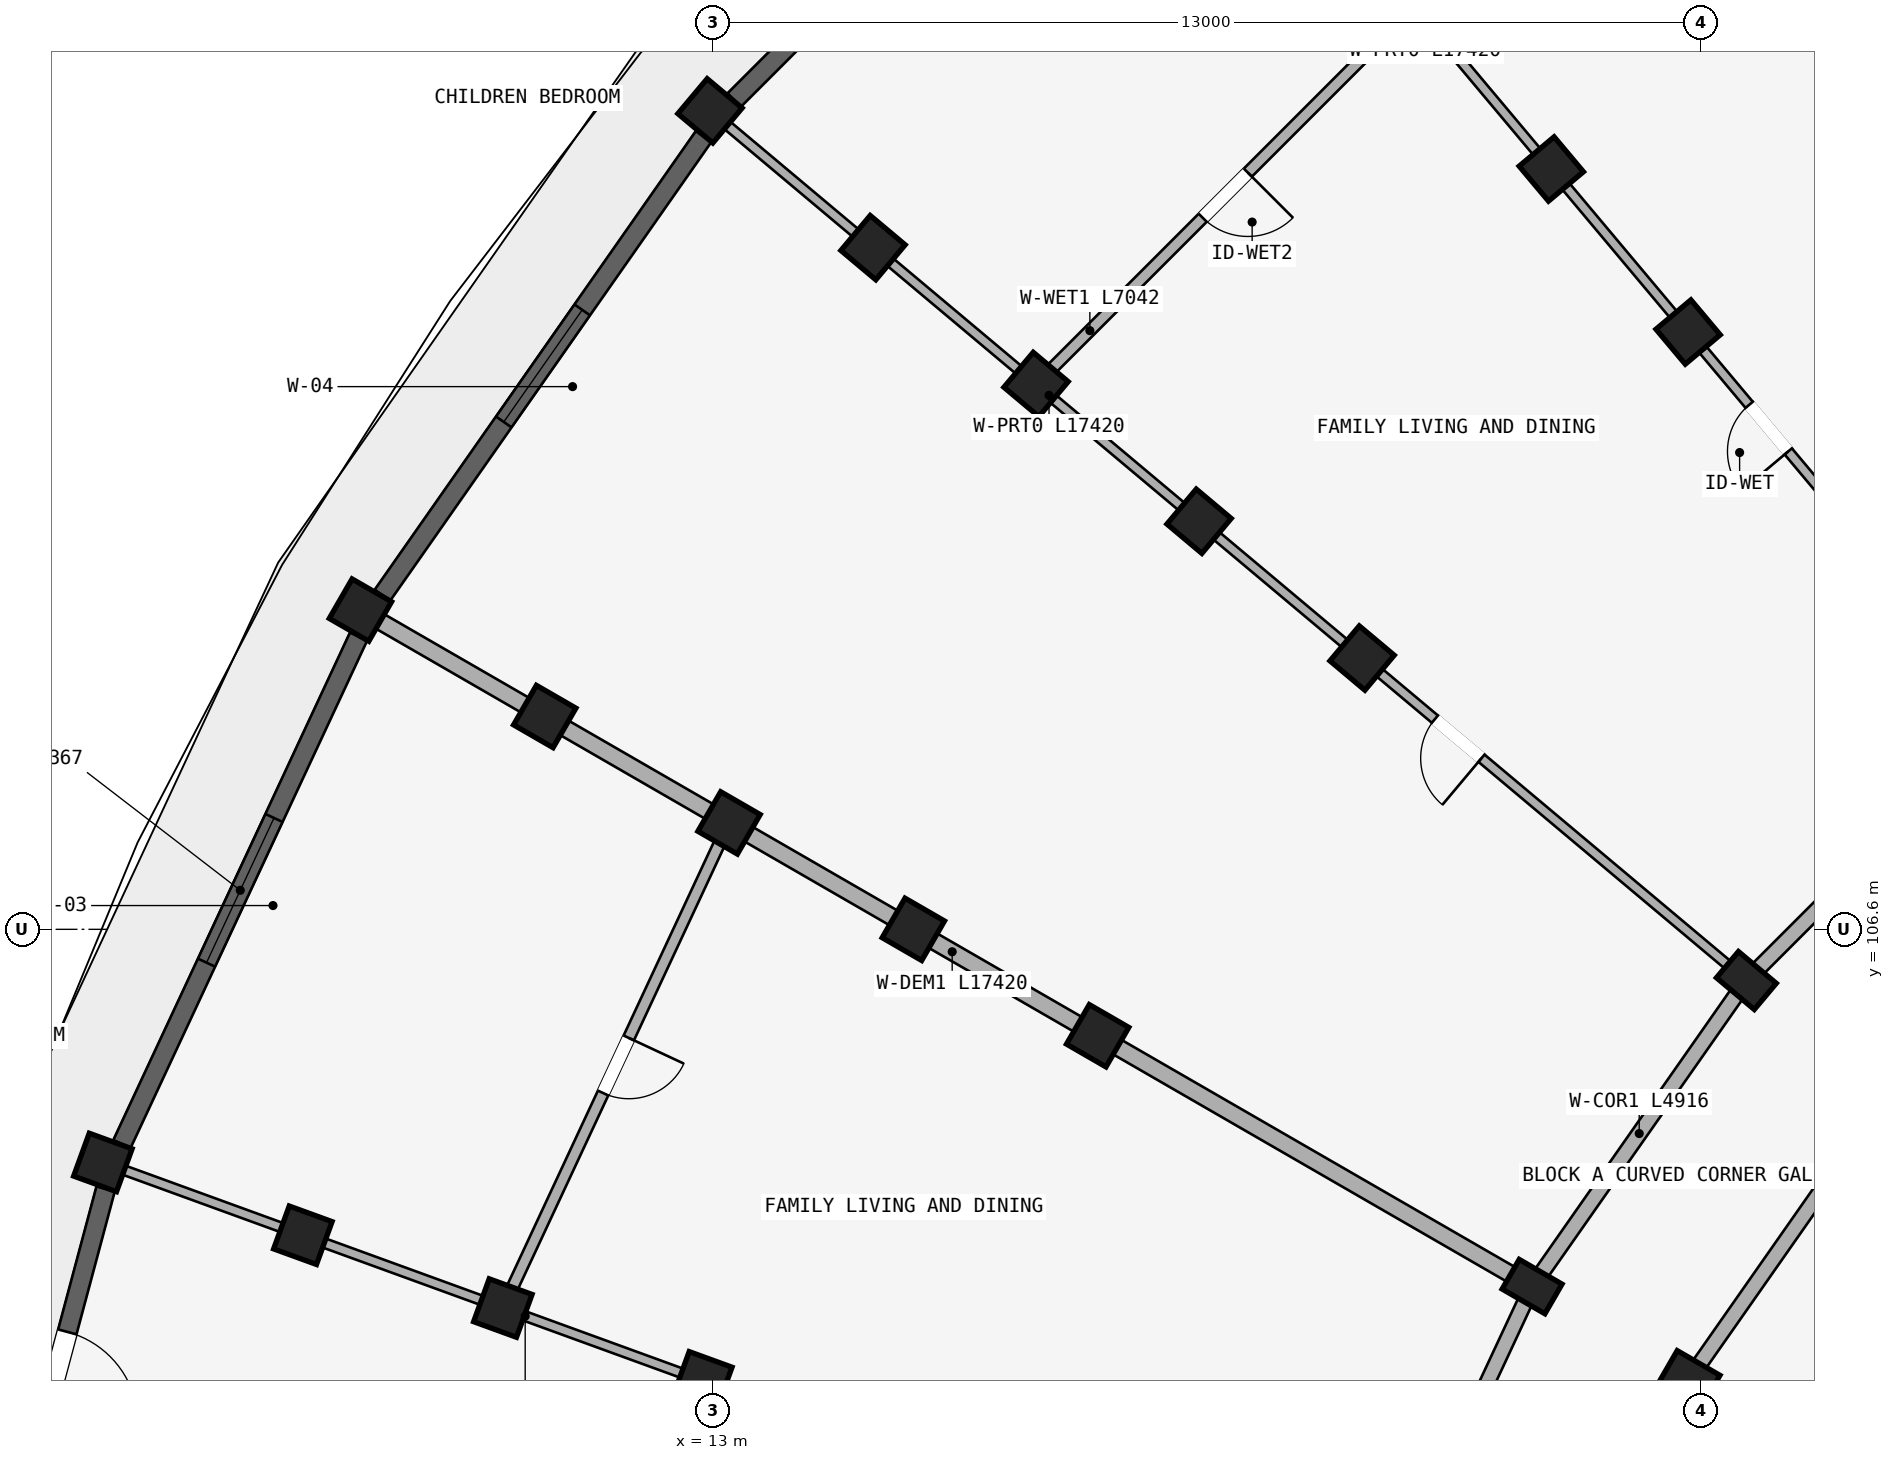
"""IFC4 building model, lengths in metres.
Left out: names, types, materials, properties, quantities, classifications, styles, units other than length and angle.
Written with IfcOpenShell. Run it as: python <this file> out.ifc"""

import sys

from ifc_helpers import new_model, si_unit, direction, frame, frame_2d, origin, origin_2d, place, context, subcontext, project, spatial, rectangle, extrude, element, fill, save


model = new_model("IFC4")
c1 = context("Model", 3, precision=1e-05, world=origin(), true_north=direction((0.0, 1.0)))
c2 = subcontext(c1, "Body", "Model", "MODEL_VIEW")
j1 = project(units=[si_unit("LENGTHUNIT", "METRE"), si_unit("PLANEANGLEUNIT", "RADIAN")], contexts=[c1])
p1 = place(None, origin())
s1 = spatial("IfcSite", under=j1, at=p1, CompositionType="ELEMENT")
p2 = place(p1, origin())
s2 = spatial("IfcBuilding", under=s1, at=p2, CompositionType="ELEMENT")
p3 = place(p2, frame((0.0, 0.0, 30.75)))
s3 = spatial("IfcBuildingStorey", under=s2, at=p3, CompositionType="ELEMENT", Elevation=30.75)
for number, where, z_axis, x_axis in (
    (1, (25.831, 114.458, 0.0), (0.0, 0.0, 1.0), (0.766, 0.643, 0.0)),
    (2, (24.031, 116.603, 0.0), (0.0, 0.0, 1.0), (0.766, 0.643, 0.0)),
):
    element("IfcColumn", number, at=place(p3, frame(where, z_axis=z_axis, x_axis=x_axis)), inside=s3, PredefinedType="COLUMN", context=c2, shape_type="SweptSolid", body=[
        extrude(rectangle(XDim=0.6, YDim=0.6, at=origin_2d()), origin(), (0.0, 0.0, 1.0), 2.93),
    ])
p4 = place(p3, frame((26.598, 105.927, 0.0), z_axis=(0.0, 0.0, 1.0), x_axis=(0.642787609687, 0.766044443119, 0.0)))
e3 = element("IfcColumn", 3, at=p4, inside=s3, PredefinedType="COLUMN", context=c2, shape_type="SweptSolid", body=[
    extrude(rectangle(XDim=0.45, YDim=0.65, at=origin_2d()), origin(), (0.0, 0.0, 1.0), 2.93),
])
for number, where, z_axis, x_axis in (
    (4, (21.542, 110.169, 0.0), (0.0, 0.0, 1.0), (0.643, 0.766, 0.0)),
    (5, (19.397, 111.969, 0.0), (0.0, 0.0, 1.0), (0.643, 0.766, 0.0)),
    (6, (17.252, 113.769, 0.0), (0.0, 0.0, 1.0), (0.643, 0.766, 0.0)),
    (7, (15.107, 115.568, 0.0), (0.0, 0.0, 1.0), (0.643, 0.766, 0.0)),
    (8, (12.962, 117.368, 0.0), (0.0, 0.0, 1.0), (0.643, 0.766, 0.0)),
):
    element("IfcColumn", number, at=place(p3, frame(where, z_axis=z_axis, x_axis=x_axis)), inside=s3, PredefinedType="COLUMN", context=c2, shape_type="SweptSolid", body=[
        extrude(rectangle(XDim=0.6, YDim=0.6, at=origin_2d()), origin(), (0.0, 0.0, 1.0), 2.93),
    ])
for number, where, z_axis, x_axis in (
    (9, (25.856, 100.7, 0.0), (0.0, 0.0, 1.0), (0.5, 0.866, 0.0)),
    (10, (23.778, 101.9, 0.0), (0.0, 0.0, 1.0), (0.5, 0.866, 0.0)),
):
    element("IfcColumn", number, at=place(p3, frame(where, z_axis=z_axis, x_axis=x_axis)), inside=s3, PredefinedType="COLUMN", context=c2, shape_type="SweptSolid", body=[
        extrude(rectangle(XDim=0.45, YDim=0.65, at=origin_2d()), origin(), (0.0, 0.0, 1.0), 2.93),
    ])
for number, where, z_axis, x_axis in (
    (11, (18.062, 105.2, 0.0), (0.0, 0.0, 1.0), (0.5, 0.866, 0.0)),
    (12, (15.637, 106.6, 0.0), (0.0, 0.0, 1.0), (0.5, 0.866, 0.0)),
    (13, (13.213, 108.0, 0.0), (0.0, 0.0, 1.0), (0.5, 0.866, 0.0)),
    (14, (10.788, 109.4, 0.0), (0.0, 0.0, 1.0), (0.5, 0.866, 0.0)),
    (15, (8.363, 110.8, 0.0), (0.0, 0.0, 1.0), (0.5, 0.866, 0.0)),
    (16, (12.868, 100.66, 0.0), (0.0, 0.0, 1.0), (0.342, 0.94, 0.0)),
    (17, (10.236, 101.618, 0.0), (0.0, 0.0, 1.0), (0.342, 0.94, 0.0)),
    (18, (7.605, 102.575, 0.0), (0.0, 0.0, 1.0), (0.342, 0.94, 0.0)),
    (19, (4.974, 103.533, 0.0), (0.0, 0.0, 1.0), (0.342, 0.94, 0.0)),
):
    element("IfcColumn", number, at=place(p3, frame(where, z_axis=z_axis, x_axis=x_axis)), inside=s3, PredefinedType="COLUMN", context=c2, shape_type="SweptSolid", body=[
        extrude(rectangle(XDim=0.6, YDim=0.6, at=origin_2d()), origin(), (0.0, 0.0, 1.0), 2.93),
    ])
p5 = place(p3, frame((30.073, 109.402, 0.0), z_axis=(0.0, 0.0, 1.0), x_axis=(-0.707106781187, -0.707106781187, 0.0)))
e20 = element("IfcWall", 20, at=p5, inside=s3, PredefinedType="STANDARD", context=c2, shape_type="SweptSolid", body=[
    extrude(rectangle(XDim=4.916, YDim=0.2, at=frame_2d((2.458, 0.0))), origin(), (0.0, 0.0, 1.0), 2.372),
])
p6 = place(p3, frame((28.436, 104.384, 0.0), z_axis=(0.0, 0.0, 1.0), x_axis=(-0.573571637217, -0.819155404658, 0.0)))
e21 = element("IfcWall", 21, at=p6, inside=s3, PredefinedType="STANDARD", context=c2, shape_type="SweptSolid", body=[
    extrude(rectangle(XDim=4.497, YDim=0.2, at=frame_2d((2.249, 0.0))), origin(), (0.0, 0.0, 1.0), 2.372),
])
p7 = place(p3, frame((26.598, 105.927, 0.0), z_axis=(0.0, 0.0, 1.0), x_axis=(-0.573592335331, -0.819140911474, 0.0)))
e22 = element("IfcWall", 22, at=p7, inside=s3, PredefinedType="STANDARD", context=c2, shape_type="SweptSolid", body=[
    extrude(rectangle(XDim=4.916, YDim=0.2, at=frame_2d((2.458, 0.0))), origin(), (0.0, 0.0, 1.0), 2.372),
])
p8 = place(p3, frame((25.856, 100.7, 0.0), z_axis=(0.0, 0.0, 1.0), x_axis=(-0.422617978463, -0.906307919131, 0.0)))
e23 = element("IfcWall", 23, at=p8, inside=s3, PredefinedType="STANDARD", context=c2, shape_type="SweptSolid", body=[
    extrude(rectangle(XDim=4.497, YDim=0.2, at=frame_2d((2.249, 0.0))), origin(), (0.0, 0.0, 1.0), 2.372),
])
p9 = place(p8, frame((1.749, 0.0, 0.0)))
e24 = element("IfcOpeningElement", 24, at=p9, cuts=e23, PredefinedType="OPENING", context=c2, shape_type="SweptSolid", body=[
    extrude(rectangle(XDim=1.0, YDim=2.15, at=frame_2d((0.5, 1.075))), frame((0.0, 0.11, 0.0), z_axis=(0.0, -1.0, 0.0), x_axis=(1.0, 0.0, 0.0)), (0.0, 0.0, 1.0), 0.22),
])
p10 = place(p3, frame((23.778, 101.9, 0.0), z_axis=(0.0, 0.0, 1.0), x_axis=(-0.422629854778, -0.906302381024, 0.0)))
e25 = element("IfcWall", 25, at=p10, inside=s3, PredefinedType="STANDARD", context=c2, shape_type="SweptSolid", body=[
    extrude(rectangle(XDim=4.915, YDim=0.2, at=frame_2d((2.458, 0.0))), origin(), (0.0, 0.0, 1.0), 2.372),
])
p11 = place(p10, frame((1.918, 0.0, 0.0)))
e26 = element("IfcOpeningElement", 26, at=p11, cuts=e25, PredefinedType="OPENING", context=c2, shape_type="SweptSolid", body=[
    extrude(rectangle(XDim=1.08, YDim=2.15, at=frame_2d((0.54, 1.075))), frame((0.0, 0.11, 0.0), z_axis=(0.0, -1.0, 0.0), x_axis=(1.0, 0.0, 0.0)), (0.0, 0.0, 1.0), 0.22),
])
p12 = place(p3, frame((34.05, 112.309, 0.0), z_axis=(0.0, 0.0, 1.0), x_axis=(-0.499997843263, 0.866026648973, 0.0)))
e27 = element("IfcWall", 27, at=p12, inside=s3, PredefinedType="STANDARD", context=c2, shape_type="SweptSolid", body=[
    extrude(rectangle(XDim=17.42, YDim=0.22, at=frame_2d((8.71, 0.0))), origin(), (0.0, 0.0, 1.0), 2.372),
])
p13 = place(p3, frame((30.009, 109.479, 0.0), z_axis=(0.0, 0.0, 1.0), x_axis=(-0.642784757967, 0.766046835987, 0.0)))
e28 = element("IfcWall", 28, at=p13, inside=s3, PredefinedType="PARTITIONING", context=c2, shape_type="SweptSolid", body=[
    extrude(rectangle(XDim=17.42, YDim=0.125, at=frame_2d((8.71, 0.0))), origin(), (0.0, 0.0, 1.0), 2.372),
])
p14 = place(p13, frame((4.45, 0.0, 0.0)))
e29 = element("IfcOpeningElement", 29, at=p14, cuts=e28, PredefinedType="OPENING", context=c2, shape_type="SweptSolid", body=[
    extrude(rectangle(XDim=0.8, YDim=2.1, at=frame_2d((0.4, 1.05))), frame((0.0, 0.073, 0.0), z_axis=(0.0, -1.0, 0.0), x_axis=(1.0, 0.0, 0.0)), (0.0, 0.0, 1.0), 0.145),
])
p15 = place(p3, frame((26.521, 105.991, 0.0), z_axis=(0.0, 0.0, 1.0), x_axis=(-0.766046835987, 0.642784757967, 0.0)))
e30 = element("IfcWall", 30, at=p15, inside=s3, PredefinedType="PARTITIONING", context=c2, shape_type="SweptSolid", body=[
    extrude(rectangle(XDim=17.42, YDim=0.125, at=frame_2d((8.71, 0.0))), origin(), (0.0, 0.0, 1.0), 2.372),
])
p16 = place(p15, frame((4.45, 0.0, 0.0)))
e31 = element("IfcOpeningElement", 31, at=p16, cuts=e30, PredefinedType="OPENING", context=c2, shape_type="SweptSolid", body=[
    extrude(rectangle(XDim=0.8, YDim=2.1, at=frame_2d((0.4, 1.05))), frame((0.0, 0.073, 0.0), z_axis=(0.0, -1.0, 0.0), x_axis=(1.0, 0.0, 0.0)), (0.0, 0.0, 1.0), 0.145),
])
p17 = place(p3, frame((31.746, 97.3, 0.0), z_axis=(0.0, 0.0, 1.0), x_axis=(-0.866026575979, 0.499997969693, 0.0)))
e32 = element("IfcWall", 32, at=p17, inside=s3, PredefinedType="STANDARD", context=c2, shape_type="SweptSolid", body=[
    extrude(rectangle(XDim=6.75, YDim=0.22, at=frame_2d((3.375, 0.0))), origin(), (0.0, 0.0, 1.0), 2.372),
])
p18 = place(p3, frame((23.691, 101.95, 0.0), z_axis=(0.0, 0.0, 1.0), x_axis=(-0.866026648973, 0.499997843263, 0.0)))
e33 = element("IfcWall", 33, at=p18, inside=s3, PredefinedType="STANDARD", context=c2, shape_type="SweptSolid", body=[
    extrude(rectangle(XDim=17.42, YDim=0.22, at=frame_2d((8.71, 0.0))), origin(), (0.0, 0.0, 1.0), 2.372),
])
p19 = place(p3, frame((21.607, 97.479, 0.0), z_axis=(0.0, 0.0, 1.0), x_axis=(-0.939691901159, 0.342022120477, 0.0)))
e34 = element("IfcWall", 34, at=p19, inside=s3, PredefinedType="PARTITIONING", context=c2, shape_type="SweptSolid", body=[
    extrude(rectangle(XDim=17.42, YDim=0.125, at=frame_2d((8.71, 0.0))), origin(), (0.0, 0.0, 1.0), 2.372),
])
p20 = place(p19, frame((4.45, 0.0, 0.0)))
e35 = element("IfcOpeningElement", 35, at=p20, cuts=e34, PredefinedType="OPENING", context=c2, shape_type="SweptSolid", body=[
    extrude(rectangle(XDim=0.8, YDim=2.1, at=frame_2d((0.4, 1.05))), frame((0.0, 0.073, 0.0), z_axis=(0.0, -1.0, 0.0), x_axis=(1.0, 0.0, 0.0)), (0.0, 0.0, 1.0), 0.145),
])
p21 = place(p3, frame((22.231, 118.748, 0.0), z_axis=(0.0, 0.0, 1.0), x_axis=(-0.707106781187, -0.707106781187, 0.0)))
e36 = element("IfcWall", 36, at=p21, inside=s3, PredefinedType="PLUMBINGWALL", context=c2, shape_type="SweptSolid", body=[
    extrude(rectangle(XDim=7.042, YDim=0.15, at=frame_2d((3.521, 0.0))), origin(), (0.0, 0.0, 1.0), 2.372),
])
p22 = place(p21, frame((3.101, 0.0, 0.0)))
e37 = element("IfcOpeningElement", 37, at=p22, cuts=e36, PredefinedType="OPENING", context=c2, shape_type="SweptSolid", body=[
    extrude(rectangle(XDim=0.84, YDim=2.1, at=frame_2d((0.42, 1.05))), frame((0.0, 0.085, 0.0), z_axis=(0.0, -1.0, 0.0), x_axis=(1.0, 0.0, 0.0)), (0.0, 0.0, 1.0), 0.17),
])
p23 = place(p3, frame((13.213, 108.0, 0.0), z_axis=(0.0, 0.0, 1.0), x_axis=(-0.422640621205, -0.906297360311, 0.0)))
e38 = element("IfcWall", 38, at=p23, inside=s3, PredefinedType="PLUMBINGWALL", context=c2, shape_type="SweptSolid", body=[
    extrude(rectangle(XDim=7.042, YDim=0.15, at=frame_2d((3.521, 0.0))), origin(), (0.0, 0.0, 1.0), 2.372),
])
p24 = place(p23, frame((3.121, 0.0, 0.0)))
e39 = element("IfcOpeningElement", 39, at=p24, cuts=e38, PredefinedType="OPENING", context=c2, shape_type="SweptSolid", body=[
    extrude(rectangle(XDim=0.8, YDim=2.1, at=frame_2d((0.4, 1.05))), frame((0.0, 0.085, 0.0), z_axis=(0.0, -1.0, 0.0), x_axis=(1.0, 0.0, 0.0)), (0.0, 0.0, 1.0), 0.17),
])
p25 = place(p3, frame((18.49, 122.719, 0.0), z_axis=(0.0, 0.0, 1.0), x_axis=(-0.707106781187, -0.707106781187, 0.0)))
e40 = element("IfcWall", 40, at=p25, inside=s3, PredefinedType="STANDARD", context=c2, shape_type="SweptSolid", body=[
    extrude(rectangle(XDim=7.367, YDim=0.25, at=frame_2d((3.684, 0.0))), origin(), (0.0, 0.0, 1.0), 2.372),
])
p26 = place(p25, frame((4.84, 0.0, 0.422)))
e41 = element("IfcOpeningElement", 41, at=p26, cuts=e40, PredefinedType="OPENING", context=c2, shape_type="SweptSolid", body=[
    extrude(rectangle(XDim=1.2, YDim=1.5, at=frame_2d((0.6, 0.75))), frame((0.0, 0.135, 0.0), z_axis=(0.0, -1.0, 0.0), x_axis=(1.0, 0.0, 0.0)), (0.0, 0.0, 1.0), 0.27),
])
p27 = place(p25, frame((1.948, 0.0, 0.0)))
e42 = element("IfcOpeningElement", 42, at=p27, cuts=e40, PredefinedType="OPENING", context=c2, shape_type="SweptSolid", body=[
    extrude(rectangle(XDim=1.26, YDim=2.15, at=frame_2d((0.63, 1.075))), frame((0.0, 0.135, 0.0), z_axis=(0.0, -1.0, 0.0), x_axis=(1.0, 0.0, 0.0)), (0.0, 0.0, 1.0), 0.27),
])
p28 = place(p3, frame((12.878, 117.03, 0.0), z_axis=(0.0, 0.0, 1.0), x_axis=(-0.573582441919, -0.819147839112, 0.0)))
e43 = element("IfcWall", 43, at=p28, inside=s3, PredefinedType="STANDARD", context=c2, shape_type="SweptSolid", body=[
    extrude(rectangle(XDim=7.367, YDim=0.25, at=frame_2d((3.684, 0.0))), origin(), (0.0, 0.0, 1.0), 2.372),
])
p29 = place(p28, frame((2.783, 0.0, 0.522)))
e44 = element("IfcOpeningElement", 44, at=p29, cuts=e43, PredefinedType="OPENING", context=c2, shape_type="SweptSolid", body=[
    extrude(rectangle(XDim=1.8, YDim=1.65, at=frame_2d((0.9, 0.825))), frame((0.0, 0.135, 0.0), z_axis=(0.0, -1.0, 0.0), x_axis=(1.0, 0.0, 0.0)), (0.0, 0.0, 1.0), 0.27),
])
p30 = place(p3, frame((8.338, 110.452, 0.0), z_axis=(0.0, 0.0, 1.0), x_axis=(-0.422589730823, -0.906321090675, 0.0)))
e45 = element("IfcWall", 45, at=p30, inside=s3, PredefinedType="STANDARD", context=c2, shape_type="SweptSolid", body=[
    extrude(rectangle(XDim=7.367, YDim=0.25, at=frame_2d((3.684, 0.0))), origin(), (0.0, 0.0, 1.0), 2.372),
])
p31 = place(p30, frame((2.634, 0.0, 0.372)))
e46 = element("IfcOpeningElement", 46, at=p31, cuts=e45, PredefinedType="OPENING", context=c2, shape_type="SweptSolid", body=[
    extrude(rectangle(XDim=2.1, YDim=1.8, at=frame_2d((1.05, 0.9))), frame((0.0, 0.135, 0.0), z_axis=(0.0, -1.0, 0.0), x_axis=(1.0, 0.0, 0.0)), (0.0, 0.0, 1.0), 0.27),
])
p32 = place(p3, frame((5.01, 103.186, 0.0), z_axis=(0.0, 0.0, 1.0), x_axis=(-0.258821669831, -0.965925122991, 0.0)))
e47 = element("IfcWall", 47, at=p32, inside=s3, PredefinedType="STANDARD", context=c2, shape_type="SweptSolid", body=[
    extrude(rectangle(XDim=7.367, YDim=0.25, at=frame_2d((3.684, 0.0))), origin(), (0.0, 0.0, 1.0), 2.372),
])
p33 = place(p32, frame((4.84, 0.0, 0.322)))
e48 = element("IfcOpeningElement", 48, at=p33, cuts=e47, PredefinedType="OPENING", context=c2, shape_type="SweptSolid", body=[
    extrude(rectangle(XDim=1.2, YDim=1.5, at=frame_2d((0.6, 0.75))), frame((0.0, 0.135, 0.0), z_axis=(0.0, -1.0, 0.0), x_axis=(1.0, 0.0, 0.0)), (0.0, 0.0, 1.0), 0.27),
])
p34 = place(p32, frame((1.948, 0.0, 0.0)))
e49 = element("IfcOpeningElement", 49, at=p34, cuts=e47, PredefinedType="OPENING", context=c2, shape_type="SweptSolid", body=[
    extrude(rectangle(XDim=1.26, YDim=2.15, at=frame_2d((0.63, 1.075))), frame((0.0, 0.135, 0.0), z_axis=(0.0, -1.0, 0.0), x_axis=(1.0, 0.0, 0.0)), (0.0, 0.0, 1.0), 0.27),
])
p35 = place(p29, origin())
e50 = element("IfcWindow", 50, at=p35, inside=s3, PartitioningType="DOUBLE_PANEL_VERTICAL", PredefinedType="WINDOW", context=c2, shape_type="SweptSolid", body=[
    extrude(rectangle(XDim=1.8, YDim=1.65, at=frame_2d((0.9, 0.825))), frame((0.0, 0.03, 0.0), z_axis=(0.0, -1.0, 0.0), x_axis=(1.0, 0.0, 0.0)), (0.0, 0.0, 1.0), 0.06),
])
fill(e44, e50)
p36 = place(p31, origin())
e51 = element("IfcWindow", 51, at=p36, inside=s3, PartitioningType="TRIPLE_PANEL_VERTICAL", PredefinedType="WINDOW", context=c2, shape_type="SweptSolid", body=[
    extrude(rectangle(XDim=2.1, YDim=1.8, at=frame_2d((1.05, 0.9))), frame((0.0, 0.03, 0.0), z_axis=(0.0, -1.0, 0.0), x_axis=(1.0, 0.0, 0.0)), (0.0, 0.0, 1.0), 0.06),
])
fill(e46, e51)
p37 = place(p14, frame((0.8, 0.0, 0.0), z_axis=(0.0, 0.0, 1.0), x_axis=(-1.0, 0.0, 0.0)))
e52 = element("IfcDoor", 52, at=p37, inside=s3, OperationType="SINGLE_SWING_RIGHT", PredefinedType="DOOR", context=c2, shape_type="SweptSolid", body=[
    extrude(rectangle(XDim=0.8, YDim=2.1, at=frame_2d((0.4, 1.05))), frame((0.0, 0.025, 0.0), z_axis=(0.0, -1.0, 0.0), x_axis=(1.0, 0.0, 0.0)), (0.0, 0.0, 1.0), 0.05),
])
fill(e29, e52)
p38 = place(p16, frame((0.8, 0.0, 0.0), z_axis=(0.0, 0.0, 1.0), x_axis=(-1.0, 0.0, 0.0)))
e53 = element("IfcDoor", 53, at=p38, inside=s3, OperationType="SINGLE_SWING_RIGHT", PredefinedType="DOOR", context=c2, shape_type="SweptSolid", body=[
    extrude(rectangle(XDim=0.8, YDim=2.1, at=frame_2d((0.4, 1.05))), frame((0.0, 0.025, 0.0), z_axis=(0.0, -1.0, 0.0), x_axis=(1.0, 0.0, 0.0)), (0.0, 0.0, 1.0), 0.05),
])
fill(e31, e53)
p39 = place(p22, frame((0.84, 0.0, 0.0), z_axis=(0.0, 0.0, 1.0), x_axis=(-1.0, 0.0, 0.0)))
e54 = element("IfcDoor", 54, at=p39, inside=s3, OperationType="SINGLE_SWING_RIGHT", PredefinedType="DOOR", context=c2, shape_type="SweptSolid", body=[
    extrude(rectangle(XDim=0.84, YDim=2.1, at=frame_2d((0.42, 1.05))), frame((0.0, 0.025, 0.0), z_axis=(0.0, -1.0, 0.0), x_axis=(1.0, 0.0, 0.0)), (0.0, 0.0, 1.0), 0.05),
])
fill(e37, e54)
p40 = place(p24, frame((0.8, 0.0, 0.0), z_axis=(0.0, 0.0, 1.0), x_axis=(-1.0, 0.0, 0.0)))
e55 = element("IfcDoor", 55, at=p40, inside=s3, OperationType="SINGLE_SWING_RIGHT", PredefinedType="DOOR", context=c2, shape_type="SweptSolid", body=[
    extrude(rectangle(XDim=0.8, YDim=2.1, at=frame_2d((0.4, 1.05))), frame((0.0, 0.025, 0.0), z_axis=(0.0, -1.0, 0.0), x_axis=(1.0, 0.0, 0.0)), (0.0, 0.0, 1.0), 0.05),
])
fill(e39, e55)
p41 = place(p34, frame((1.26, 0.0, 0.0), z_axis=(0.0, 0.0, 1.0), x_axis=(-1.0, 0.0, 0.0)))
e56 = element("IfcDoor", 56, at=p41, inside=s3, OperationType="SINGLE_SWING_LEFT", PredefinedType="DOOR", context=c2, shape_type="SweptSolid", body=[
    extrude(rectangle(XDim=1.26, YDim=2.15, at=frame_2d((0.63, 1.075))), frame((0.0, 0.025, 0.0), z_axis=(0.0, -1.0, 0.0), x_axis=(1.0, 0.0, 0.0)), (0.0, 0.0, 1.0), 0.05),
])
fill(e49, e56)
save(model, sys.argv[1])
